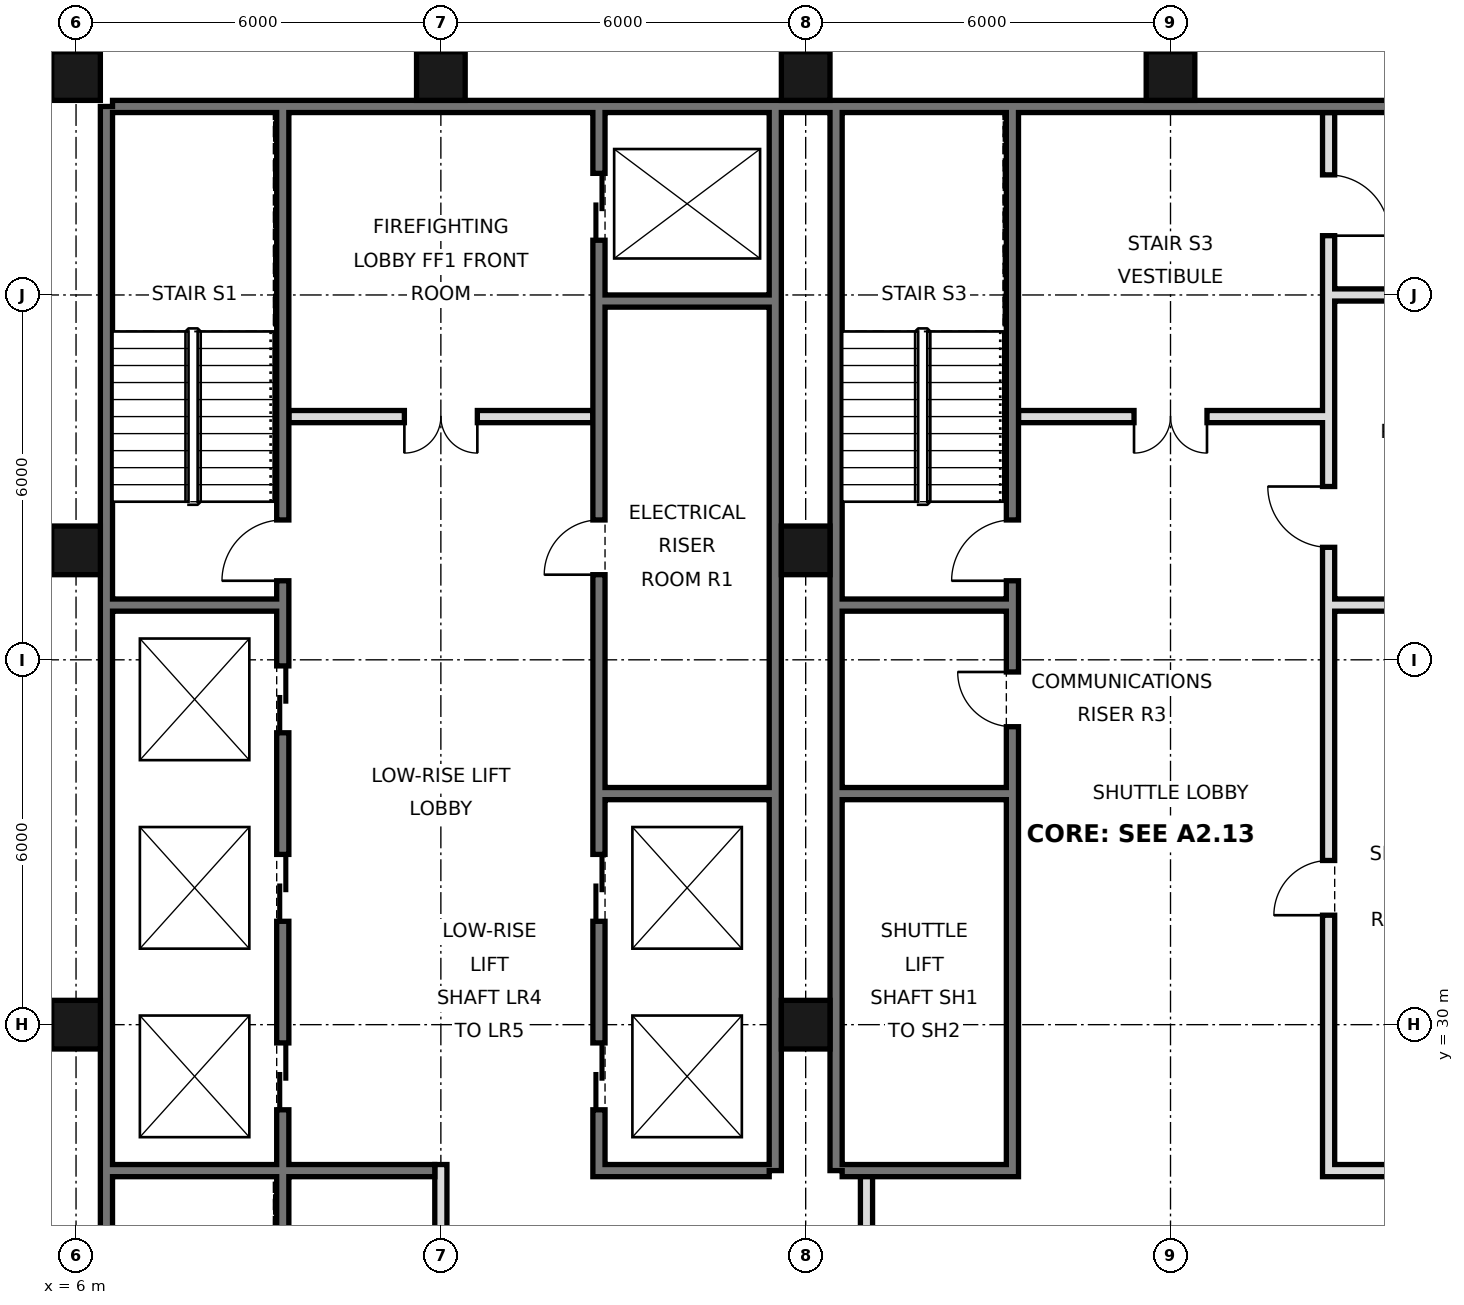
"""IFC4 building model, lengths in metres.
Left out: names, types, materials, properties, quantities, classifications, styles, units other than length and angle.
Written with IfcOpenShell. Run it as: python <this file> out.ifc"""

import sys

from ifc_helpers import new_model, si_unit, direction, frame, frame_2d, origin, origin_2d, place, context, subcontext, project, spatial, rectangle, hollow_rectangle, extrude, element, fill, save


model = new_model("IFC4")
c1 = context("Model", 3, precision=1e-05, world=origin(), true_north=direction((0.0, 1.0)))
c2 = subcontext(c1, "Body", "Model", "MODEL_VIEW")
j1 = project(units=[si_unit("LENGTHUNIT", "METRE"), si_unit("PLANEANGLEUNIT", "RADIAN")], contexts=[c1])
p1 = place(None, origin())
s1 = spatial("IfcSite", under=j1, at=p1, CompositionType="ELEMENT")
p2 = place(p1, origin())
s2 = spatial("IfcBuilding", under=s1, at=p2, CompositionType="ELEMENT")
p3 = place(p2, frame((0.0, 0.0, 53.4)))
s3 = spatial("IfcBuildingStorey", under=s2, at=p3, CompositionType="ELEMENT", Elevation=53.4)
for number, where, z_axis, x_axis in (
    (1, (6.0, 30.0, 0.0), (0.0, 0.0, 1.0), (1.0, 0.0, 0.0)),
    (2, (6.0, 37.8, 0.0), (0.0, 0.0, 1.0), (1.0, 0.0, 0.0)),
    (3, (6.0, 45.6, 0.0), (0.0, 0.0, 1.0), (1.0, 0.0, 0.0)),
    (4, (12.0, 45.6, 0.0), (0.0, 0.0, 1.0), (1.0, 0.0, 0.0)),
    (5, (18.0, 30.0, 0.0), (0.0, 0.0, 1.0), (1.0, 0.0, 0.0)),
    (6, (18.0, 37.8, 0.0), (0.0, 0.0, 1.0), (1.0, 0.0, 0.0)),
    (7, (18.0, 45.6, 0.0), (0.0, 0.0, 1.0), (1.0, 0.0, 0.0)),
    (8, (24.0, 45.6, 0.0), (0.0, 0.0, 1.0), (1.0, 0.0, 0.0)),
):
    element("IfcColumn", number, at=place(p3, frame(where, z_axis=z_axis, x_axis=x_axis)), inside=s3, PredefinedType="COLUMN", context=c2, shape_type="SweptSolid", body=[
        extrude(hollow_rectangle(XDim=0.8, YDim=0.8, WallThickness=0.06, at=origin_2d()), origin(), (0.0, 0.0, 1.0), 3.6),
    ])
p4 = place(p3, frame((6.5, 21.6, 0.0), z_axis=(0.0, 0.0, 1.0), x_axis=(0.0, 1.0, 0.0)))
e9 = element("IfcWall", 9, at=p4, inside=s3, PredefinedType="SOLIDWALL", context=c2, shape_type="SweptSolid", body=[
    extrude(rectangle(XDim=23.5, YDim=0.2, at=frame_2d((11.75, 0.0))), origin(), (0.0, 0.0, 1.0), 3.42),
])
p5 = place(p3, frame((6.6, 45.1, 0.0), z_axis=(0.0, 0.0, 1.0), x_axis=(1.0, 0.0, 0.0)))
e10 = element("IfcWall", 10, at=p5, inside=s3, PredefinedType="SOLIDWALL", context=c2, shape_type="SweptSolid", body=[
    extrude(rectangle(XDim=34.8, YDim=0.2, at=frame_2d((17.4, 0.0))), origin(), (0.0, 0.0, 1.0), 3.42),
])
for number, where, z_axis, x_axis in (
    (11, (17.5, 27.6, 0.0), (0.0, 0.0, 1.0), (0.0, 1.0, 0.0)),
    (12, (18.5, 27.6, 0.0), (0.0, 0.0, 1.0), (0.0, 1.0, 0.0)),
):
    element("IfcWall", number, at=place(p3, frame(where, z_axis=z_axis, x_axis=x_axis)), inside=s3, PredefinedType="SOLIDWALL", context=c2, shape_type="SweptSolid", body=[
        extrude(rectangle(XDim=17.5, YDim=0.2, at=frame_2d((8.75, 0.0))), origin(), (0.0, 0.0, 1.0), 3.42),
    ])
p6 = place(p3, frame((19.0, 21.6, 0.0), z_axis=(0.0, 0.0, 1.0), x_axis=(0.0, 1.0, 0.0)))
e13 = element("IfcWall", 13, at=p6, inside=s3, PredefinedType="PARTITIONING", context=c2, shape_type="SweptSolid", body=[
    extrude(rectangle(XDim=6.0, YDim=0.2, at=frame_2d((3.0, 0.0))), origin(), (0.0, 0.0, 1.0), 3.42),
])
p7 = place(p6, frame((2.1, 0.0, 0.0)))
e14 = element("IfcOpeningElement", 14, at=p7, cuts=e13, PredefinedType="OPENING", context=c2, shape_type="SweptSolid", body=[
    extrude(rectangle(XDim=1.8, YDim=2.1, at=frame_2d((0.9, 1.05))), frame((0.0, 0.11, 0.0), z_axis=(0.0, -1.0, 0.0), x_axis=(1.0, 0.0, 0.0)), (0.0, 0.0, 1.0), 0.22),
])
p8 = place(p3, frame((12.0, 21.6, 0.0), z_axis=(0.0, 0.0, 1.0), x_axis=(0.0, 1.0, 0.0)))
e15 = element("IfcWall", 15, at=p8, inside=s3, PredefinedType="PARTITIONING", context=c2, shape_type="SweptSolid", body=[
    extrude(rectangle(XDim=6.1, YDim=0.2, at=frame_2d((3.05, 0.0))), origin(), (0.0, 0.0, 1.0), 3.42),
])
p9 = place(p3, frame((14.6, 27.5, 0.0), z_axis=(0.0, 0.0, 1.0), x_axis=(0.0, 1.0, 0.0)))
e16 = element("IfcWall", 16, at=p9, inside=s3, PredefinedType="SOLIDWALL", context=c2, shape_type="SweptSolid", body=[
    extrude(rectangle(XDim=17.5, YDim=0.2, at=frame_2d((8.75, 0.0))), origin(), (0.0, 0.0, 1.0), 3.42),
])
p10 = place(p9, frame((1.1, 0.0, 0.0)))
e17 = element("IfcOpeningElement", 17, at=p10, cuts=e16, PredefinedType="OPENING", context=c2, shape_type="SweptSolid", body=[
    extrude(rectangle(XDim=1.1, YDim=2.1, at=frame_2d((0.55, 1.05))), frame((0.0, 0.11, 0.0), z_axis=(0.0, -1.0, 0.0), x_axis=(1.0, 0.0, 0.0)), (0.0, 0.0, 1.0), 0.22),
])
p11 = place(p9, frame((4.2, 0.0, 0.0)))
e18 = element("IfcOpeningElement", 18, at=p11, cuts=e16, PredefinedType="OPENING", context=c2, shape_type="SweptSolid", body=[
    extrude(rectangle(XDim=1.1, YDim=2.1, at=frame_2d((0.55, 1.05))), frame((0.0, 0.11, 0.0), z_axis=(0.0, -1.0, 0.0), x_axis=(1.0, 0.0, 0.0)), (0.0, 0.0, 1.0), 0.22),
])
p12 = place(p9, frame((15.4, 0.0, 0.0)))
e19 = element("IfcOpeningElement", 19, at=p12, cuts=e16, PredefinedType="OPENING", context=c2, shape_type="SweptSolid", body=[
    extrude(rectangle(XDim=1.1, YDim=2.1, at=frame_2d((0.55, 1.05))), frame((0.0, 0.11, 0.0), z_axis=(0.0, -1.0, 0.0), x_axis=(1.0, 0.0, 0.0)), (0.0, 0.0, 1.0), 0.22),
])
p13 = place(p9, frame((9.9, 0.0, 0.0)))
e20 = element("IfcOpeningElement", 20, at=p13, cuts=e16, PredefinedType="OPENING", context=c2, shape_type="SweptSolid", body=[
    extrude(rectangle(XDim=0.9, YDim=2.1, at=frame_2d((0.45, 1.05))), frame((0.0, 0.11, 0.0), z_axis=(0.0, -1.0, 0.0), x_axis=(1.0, 0.0, 0.0)), (0.0, 0.0, 1.0), 0.22),
])
p14 = place(p3, frame((21.4, 27.5, 0.0), z_axis=(0.0, 0.0, 1.0), x_axis=(0.0, 1.0, 0.0)))
e21 = element("IfcWall", 21, at=p14, inside=s3, PredefinedType="SOLIDWALL", context=c2, shape_type="SweptSolid", body=[
    extrude(rectangle(XDim=17.5, YDim=0.2, at=frame_2d((8.75, 0.0))), origin(), (0.0, 0.0, 1.0), 3.42),
])
p15 = place(p14, frame((9.8, 0.0, 0.0)))
e22 = element("IfcOpeningElement", 22, at=p15, cuts=e21, PredefinedType="OPENING", context=c2, shape_type="SweptSolid", body=[
    extrude(rectangle(XDim=1.0, YDim=2.1, at=frame_2d((0.5, 1.05))), frame((0.0, 0.11, 0.0), z_axis=(0.0, -1.0, 0.0), x_axis=(1.0, 0.0, 0.0)), (0.0, 0.0, 1.0), 0.22),
])
p16 = place(p14, frame((7.4, 0.0, 0.0)))
e23 = element("IfcOpeningElement", 23, at=p16, cuts=e21, PredefinedType="OPENING", context=c2, shape_type="SweptSolid", body=[
    extrude(rectangle(XDim=0.9, YDim=2.1, at=frame_2d((0.45, 1.05))), frame((0.0, 0.11, 0.0), z_axis=(0.0, -1.0, 0.0), x_axis=(1.0, 0.0, 0.0)), (0.0, 0.0, 1.0), 0.22),
])
p17 = place(p3, frame((26.6, 27.5, 0.0), z_axis=(0.0, 0.0, 1.0), x_axis=(0.0, 1.0, 0.0)))
e24 = element("IfcWall", 24, at=p17, inside=s3, PredefinedType="SOLIDWALL", context=c2, shape_type="SweptSolid", body=[
    extrude(rectangle(XDim=17.5, YDim=0.2, at=frame_2d((8.75, 0.0))), origin(), (0.0, 0.0, 1.0), 3.42),
])
p18 = place(p17, frame((4.3, 0.0, 0.0)))
e25 = element("IfcOpeningElement", 25, at=p18, cuts=e24, PredefinedType="OPENING", context=c2, shape_type="SweptSolid", body=[
    extrude(rectangle(XDim=0.9, YDim=2.1, at=frame_2d((0.45, 1.05))), frame((0.0, 0.11, 0.0), z_axis=(0.0, -1.0, 0.0), x_axis=(1.0, 0.0, 0.0)), (0.0, 0.0, 1.0), 0.22),
])
p19 = place(p17, frame((10.35, 0.0, 0.0)))
e26 = element("IfcOpeningElement", 26, at=p19, cuts=e24, PredefinedType="OPENING", context=c2, shape_type="SweptSolid", body=[
    extrude(rectangle(XDim=1.0, YDim=2.1, at=frame_2d((0.5, 1.05))), frame((0.0, 0.11, 0.0), z_axis=(0.0, -1.0, 0.0), x_axis=(1.0, 0.0, 0.0)), (0.0, 0.0, 1.0), 0.22),
])
p20 = place(p17, frame((15.475, 0.0, 0.0)))
e27 = element("IfcOpeningElement", 27, at=p20, cuts=e24, PredefinedType="OPENING", context=c2, shape_type="SweptSolid", body=[
    extrude(rectangle(XDim=1.0, YDim=2.1, at=frame_2d((0.5, 1.05))), frame((0.0, 0.11, 0.0), z_axis=(0.0, -1.0, 0.0), x_axis=(1.0, 0.0, 0.0)), (0.0, 0.0, 1.0), 0.22),
])
p21 = place(p3, frame((9.4, 21.6, 0.0), z_axis=(0.0, 0.0, 1.0), x_axis=(0.0, 1.0, 0.0)))
e28 = element("IfcWall", 28, at=p21, inside=s3, PredefinedType="SOLIDWALL", context=c2, shape_type="SweptSolid", body=[
    extrude(rectangle(XDim=23.4, YDim=0.2, at=frame_2d((11.7, 0.0))), origin(), (0.0, 0.0, 1.0), 3.42),
])
p22 = place(p21, frame((7.0, 0.0, 0.0)))
e29 = element("IfcOpeningElement", 29, at=p22, cuts=e28, PredefinedType="OPENING", context=c2, shape_type="SweptSolid", body=[
    extrude(rectangle(XDim=1.1, YDim=2.1, at=frame_2d((0.55, 1.05))), frame((0.0, 0.11, 0.0), z_axis=(0.0, -1.0, 0.0), x_axis=(1.0, 0.0, 0.0)), (0.0, 0.0, 1.0), 0.22),
])
p23 = place(p21, frame((10.1, 0.0, 0.0)))
e30 = element("IfcOpeningElement", 30, at=p23, cuts=e28, PredefinedType="OPENING", context=c2, shape_type="SweptSolid", body=[
    extrude(rectangle(XDim=1.1, YDim=2.1, at=frame_2d((0.55, 1.05))), frame((0.0, 0.11, 0.0), z_axis=(0.0, -1.0, 0.0), x_axis=(1.0, 0.0, 0.0)), (0.0, 0.0, 1.0), 0.22),
])
p24 = place(p21, frame((13.2, 0.0, 0.0)))
e31 = element("IfcOpeningElement", 31, at=p24, cuts=e28, PredefinedType="OPENING", context=c2, shape_type="SweptSolid", body=[
    extrude(rectangle(XDim=1.1, YDim=2.1, at=frame_2d((0.55, 1.05))), frame((0.0, 0.11, 0.0), z_axis=(0.0, -1.0, 0.0), x_axis=(1.0, 0.0, 0.0)), (0.0, 0.0, 1.0), 0.22),
])
p25 = place(p21, frame((15.7, 0.0, 0.0)))
e32 = element("IfcOpeningElement", 32, at=p25, cuts=e28, PredefinedType="OPENING", context=c2, shape_type="SweptSolid", body=[
    extrude(rectangle(XDim=1.0, YDim=2.1, at=frame_2d((0.5, 1.05))), frame((0.0, 0.11, 0.0), z_axis=(0.0, -1.0, 0.0), x_axis=(1.0, 0.0, 0.0)), (0.0, 0.0, 1.0), 0.22),
])
p26 = place(p21, frame((0.175, 0.0, 0.0)))
e33 = element("IfcOpeningElement", 33, at=p26, cuts=e28, PredefinedType="OPENING", context=c2, shape_type="SweptSolid", body=[
    extrude(rectangle(XDim=0.9, YDim=2.1, at=frame_2d((0.45, 1.05))), frame((0.0, 0.11, 0.0), z_axis=(0.0, -1.0, 0.0), x_axis=(1.0, 0.0, 0.0)), (0.0, 0.0, 1.0), 0.22),
])
for number, where, z_axis, x_axis in (
    (34, (14.7, 27.6, 0.0), (0.0, 0.0, 1.0), (1.0, 0.0, 0.0)),
    (35, (18.6, 27.6, 0.0), (0.0, 0.0, 1.0), (1.0, 0.0, 0.0)),
    (36, (26.7, 27.6, 0.0), (0.0, 0.0, 1.0), (1.0, 0.0, 0.0)),
):
    element("IfcWall", number, at=place(p3, frame(where, z_axis=z_axis, x_axis=x_axis)), inside=s3, PredefinedType="SOLIDWALL", context=c2, shape_type="SweptSolid", body=[
        extrude(rectangle(XDim=2.7, YDim=0.2, at=frame_2d((1.35, 0.0))), origin(), (0.0, 0.0, 1.0), 3.42),
    ])
p27 = place(p3, frame((6.6, 27.6, 0.0), z_axis=(0.0, 0.0, 1.0), x_axis=(1.0, 0.0, 0.0)))
e37 = element("IfcWall", 37, at=p27, inside=s3, PredefinedType="SOLIDWALL", context=c2, shape_type="SweptSolid", body=[
    extrude(rectangle(XDim=5.3, YDim=0.2, at=frame_2d((2.65, 0.0))), origin(), (0.0, 0.0, 1.0), 3.42),
])
for number, where, z_axis, x_axis in (
    (38, (14.7, 33.8, 0.0), (0.0, 0.0, 1.0), (1.0, 0.0, 0.0)),
    (39, (18.6, 33.8, 0.0), (0.0, 0.0, 1.0), (1.0, 0.0, 0.0)),
    (40, (18.6, 36.9, 0.0), (0.0, 0.0, 1.0), (1.0, 0.0, 0.0)),
    (41, (26.7, 36.9, 0.0), (0.0, 0.0, 1.0), (1.0, 0.0, 0.0)),
    (42, (6.6, 36.9, 0.0), (0.0, 0.0, 1.0), (1.0, 0.0, 0.0)),
):
    element("IfcWall", number, at=place(p3, frame(where, z_axis=z_axis, x_axis=x_axis)), inside=s3, PredefinedType="SOLIDWALL", context=c2, shape_type="SweptSolid", body=[
        extrude(rectangle(XDim=2.7, YDim=0.2, at=frame_2d((1.35, 0.0))), origin(), (0.0, 0.0, 1.0), 3.42),
    ])
p28 = place(p3, frame((21.5, 40.0, 0.0), z_axis=(0.0, 0.0, 1.0), x_axis=(1.0, 0.0, 0.0)))
e43 = element("IfcWall", 43, at=p28, inside=s3, PredefinedType="PARTITIONING", context=c2, shape_type="SweptSolid", body=[
    extrude(rectangle(XDim=5.0, YDim=0.2, at=frame_2d((2.5, 0.0))), origin(), (0.0, 0.0, 1.0), 3.42),
])
p29 = place(p28, frame((1.9, 0.0, 0.0)))
e44 = element("IfcOpeningElement", 44, at=p29, cuts=e43, PredefinedType="OPENING", context=c2, shape_type="SweptSolid", body=[
    extrude(rectangle(XDim=1.2, YDim=2.1, at=frame_2d((0.6, 1.05))), frame((0.0, 0.11, 0.0), z_axis=(0.0, -1.0, 0.0), x_axis=(1.0, 0.0, 0.0)), (0.0, 0.0, 1.0), 0.22),
])
p30 = place(p3, frame((9.5, 40.0, 0.0), z_axis=(0.0, 0.0, 1.0), x_axis=(1.0, 0.0, 0.0)))
e45 = element("IfcWall", 45, at=p30, inside=s3, PredefinedType="PARTITIONING", context=c2, shape_type="SweptSolid", body=[
    extrude(rectangle(XDim=5.0, YDim=0.2, at=frame_2d((2.5, 0.0))), origin(), (0.0, 0.0, 1.0), 3.42),
])
p31 = place(p30, frame((1.9, 0.0, 0.0)))
e46 = element("IfcOpeningElement", 46, at=p31, cuts=e45, PredefinedType="OPENING", context=c2, shape_type="SweptSolid", body=[
    extrude(rectangle(XDim=1.2, YDim=2.1, at=frame_2d((0.6, 1.05))), frame((0.0, 0.11, 0.0), z_axis=(0.0, -1.0, 0.0), x_axis=(1.0, 0.0, 0.0)), (0.0, 0.0, 1.0), 0.22),
])
p32 = place(p3, frame((14.7, 41.9, 0.0), z_axis=(0.0, 0.0, 1.0), x_axis=(1.0, 0.0, 0.0)))
e47 = element("IfcWall", 47, at=p32, inside=s3, PredefinedType="SOLIDWALL", context=c2, shape_type="SweptSolid", body=[
    extrude(rectangle(XDim=2.7, YDim=0.2, at=frame_2d((1.35, 0.0))), origin(), (0.0, 0.0, 1.0), 3.42),
])
p33 = place(p3, frame((26.7, 42.0, 0.0), z_axis=(0.0, 0.0, 1.0), x_axis=(1.0, 0.0, 0.0)))
e48 = element("IfcWall", 48, at=p33, inside=s3, PredefinedType="PARTITIONING", context=c2, shape_type="SweptSolid", body=[
    extrude(rectangle(XDim=2.7, YDim=0.2, at=frame_2d((1.35, 0.0))), origin(), (0.0, 0.0, 1.0), 3.42),
])
p34 = place(p31, frame((1.2, 0.0, 0.0), z_axis=(0.0, 0.0, 1.0), x_axis=(-1.0, 0.0, 0.0)))
e49 = element("IfcDoor", 49, at=p34, inside=s3, OperationType="DOUBLE_DOOR_SINGLE_SWING", PredefinedType="DOOR", context=c2, shape_type="SweptSolid", body=[
    extrude(rectangle(XDim=1.2, YDim=2.1, at=frame_2d((0.6, 1.05))), frame((0.0, 0.025, 0.0), z_axis=(0.0, -1.0, 0.0), x_axis=(1.0, 0.0, 0.0)), (0.0, 0.0, 1.0), 0.05),
])
fill(e46, e49)
p35 = place(p29, frame((1.2, 0.0, 0.0), z_axis=(0.0, 0.0, 1.0), x_axis=(-1.0, 0.0, 0.0)))
e50 = element("IfcDoor", 50, at=p35, inside=s3, OperationType="DOUBLE_DOOR_SINGLE_SWING", PredefinedType="DOOR", context=c2, shape_type="SweptSolid", body=[
    extrude(rectangle(XDim=1.2, YDim=2.1, at=frame_2d((0.6, 1.05))), frame((0.0, 0.025, 0.0), z_axis=(0.0, -1.0, 0.0), x_axis=(1.0, 0.0, 0.0)), (0.0, 0.0, 1.0), 0.05),
])
fill(e44, e50)
p36 = place(p10, origin())
e51 = element("IfcDoor", 51, at=p36, inside=s3, OperationType="DOUBLE_DOOR_SLIDING", PredefinedType="DOOR", context=c2, shape_type="SweptSolid", body=[
    extrude(rectangle(XDim=1.1, YDim=2.1, at=frame_2d((0.55, 1.05))), frame((0.0, 0.025, 0.0), z_axis=(0.0, -1.0, 0.0), x_axis=(1.0, 0.0, 0.0)), (0.0, 0.0, 1.0), 0.05),
])
fill(e17, e51)
p37 = place(p11, origin())
e52 = element("IfcDoor", 52, at=p37, inside=s3, OperationType="DOUBLE_DOOR_SLIDING", PredefinedType="DOOR", context=c2, shape_type="SweptSolid", body=[
    extrude(rectangle(XDim=1.1, YDim=2.1, at=frame_2d((0.55, 1.05))), frame((0.0, 0.025, 0.0), z_axis=(0.0, -1.0, 0.0), x_axis=(1.0, 0.0, 0.0)), (0.0, 0.0, 1.0), 0.05),
])
fill(e18, e52)
p38 = place(p12, origin())
e53 = element("IfcDoor", 53, at=p38, inside=s3, OperationType="DOUBLE_DOOR_SLIDING", PredefinedType="DOOR", context=c2, shape_type="SweptSolid", body=[
    extrude(rectangle(XDim=1.1, YDim=2.1, at=frame_2d((0.55, 1.05))), frame((0.0, 0.025, 0.0), z_axis=(0.0, -1.0, 0.0), x_axis=(1.0, 0.0, 0.0)), (0.0, 0.0, 1.0), 0.05),
])
fill(e19, e53)
p39 = place(p22, origin())
e54 = element("IfcDoor", 54, at=p39, inside=s3, OperationType="DOUBLE_DOOR_SLIDING", PredefinedType="DOOR", context=c2, shape_type="SweptSolid", body=[
    extrude(rectangle(XDim=1.1, YDim=2.1, at=frame_2d((0.55, 1.05))), frame((0.0, 0.025, 0.0), z_axis=(0.0, -1.0, 0.0), x_axis=(1.0, 0.0, 0.0)), (0.0, 0.0, 1.0), 0.05),
])
fill(e29, e54)
p40 = place(p23, origin())
e55 = element("IfcDoor", 55, at=p40, inside=s3, OperationType="DOUBLE_DOOR_SLIDING", PredefinedType="DOOR", context=c2, shape_type="SweptSolid", body=[
    extrude(rectangle(XDim=1.1, YDim=2.1, at=frame_2d((0.55, 1.05))), frame((0.0, 0.025, 0.0), z_axis=(0.0, -1.0, 0.0), x_axis=(1.0, 0.0, 0.0)), (0.0, 0.0, 1.0), 0.05),
])
fill(e30, e55)
p41 = place(p24, origin())
e56 = element("IfcDoor", 56, at=p41, inside=s3, OperationType="DOUBLE_DOOR_SLIDING", PredefinedType="DOOR", context=c2, shape_type="SweptSolid", body=[
    extrude(rectangle(XDim=1.1, YDim=2.1, at=frame_2d((0.55, 1.05))), frame((0.0, 0.025, 0.0), z_axis=(0.0, -1.0, 0.0), x_axis=(1.0, 0.0, 0.0)), (0.0, 0.0, 1.0), 0.05),
])
fill(e31, e56)
p42 = place(p25, origin())
e57 = element("IfcDoor", 57, at=p42, inside=s3, OperationType="SINGLE_SWING_LEFT", PredefinedType="DOOR", context=c2, shape_type="SweptSolid", body=[
    extrude(rectangle(XDim=1.0, YDim=2.1, at=frame_2d((0.5, 1.05))), frame((0.0, 0.025, 0.0), z_axis=(0.0, -1.0, 0.0), x_axis=(1.0, 0.0, 0.0)), (0.0, 0.0, 1.0), 0.05),
])
fill(e32, e57)
p43 = place(p15, origin())
e58 = element("IfcDoor", 58, at=p43, inside=s3, OperationType="SINGLE_SWING_LEFT", PredefinedType="DOOR", context=c2, shape_type="SweptSolid", body=[
    extrude(rectangle(XDim=1.0, YDim=2.1, at=frame_2d((0.5, 1.05))), frame((0.0, 0.025, 0.0), z_axis=(0.0, -1.0, 0.0), x_axis=(1.0, 0.0, 0.0)), (0.0, 0.0, 1.0), 0.05),
])
fill(e22, e58)
p44 = place(p13, origin())
e59 = element("IfcDoor", 59, at=p44, inside=s3, OperationType="SINGLE_SWING_LEFT", PredefinedType="DOOR", context=c2, shape_type="SweptSolid", body=[
    extrude(rectangle(XDim=0.9, YDim=2.1, at=frame_2d((0.45, 1.05))), frame((0.0, 0.025, 0.0), z_axis=(0.0, -1.0, 0.0), x_axis=(1.0, 0.0, 0.0)), (0.0, 0.0, 1.0), 0.05),
])
fill(e20, e59)
p45 = place(p16, frame((0.9, 0.0, 0.0), z_axis=(0.0, 0.0, 1.0), x_axis=(-1.0, 0.0, 0.0)))
e60 = element("IfcDoor", 60, at=p45, inside=s3, OperationType="SINGLE_SWING_LEFT", PredefinedType="DOOR", context=c2, shape_type="SweptSolid", body=[
    extrude(rectangle(XDim=0.9, YDim=2.1, at=frame_2d((0.45, 1.05))), frame((0.0, 0.025, 0.0), z_axis=(0.0, -1.0, 0.0), x_axis=(1.0, 0.0, 0.0)), (0.0, 0.0, 1.0), 0.05),
])
fill(e23, e60)
p46 = place(p18, origin())
e61 = element("IfcDoor", 61, at=p46, inside=s3, OperationType="SINGLE_SWING_LEFT", PredefinedType="DOOR", context=c2, shape_type="SweptSolid", body=[
    extrude(rectangle(XDim=0.9, YDim=2.1, at=frame_2d((0.45, 1.05))), frame((0.0, 0.025, 0.0), z_axis=(0.0, -1.0, 0.0), x_axis=(1.0, 0.0, 0.0)), (0.0, 0.0, 1.0), 0.05),
])
fill(e25, e61)
p47 = place(p19, frame((1.0, 0.0, 0.0), z_axis=(0.0, 0.0, 1.0), x_axis=(-1.0, 0.0, 0.0)))
e62 = element("IfcDoor", 62, at=p47, inside=s3, OperationType="SINGLE_SWING_LEFT", PredefinedType="DOOR", context=c2, shape_type="SweptSolid", body=[
    extrude(rectangle(XDim=1.0, YDim=2.1, at=frame_2d((0.5, 1.05))), frame((0.0, 0.025, 0.0), z_axis=(0.0, -1.0, 0.0), x_axis=(1.0, 0.0, 0.0)), (0.0, 0.0, 1.0), 0.05),
])
fill(e26, e62)
p48 = place(p20, frame((1.0, 0.0, 0.0), z_axis=(0.0, 0.0, 1.0), x_axis=(-1.0, 0.0, 0.0)))
e63 = element("IfcDoor", 63, at=p48, inside=s3, OperationType="SINGLE_SWING_RIGHT", PredefinedType="DOOR", context=c2, shape_type="SweptSolid", body=[
    extrude(rectangle(XDim=1.0, YDim=2.1, at=frame_2d((0.5, 1.05))), frame((0.0, 0.025, 0.0), z_axis=(0.0, -1.0, 0.0), x_axis=(1.0, 0.0, 0.0)), (0.0, 0.0, 1.0), 0.05),
])
fill(e27, e63)
save(model, sys.argv[1])
